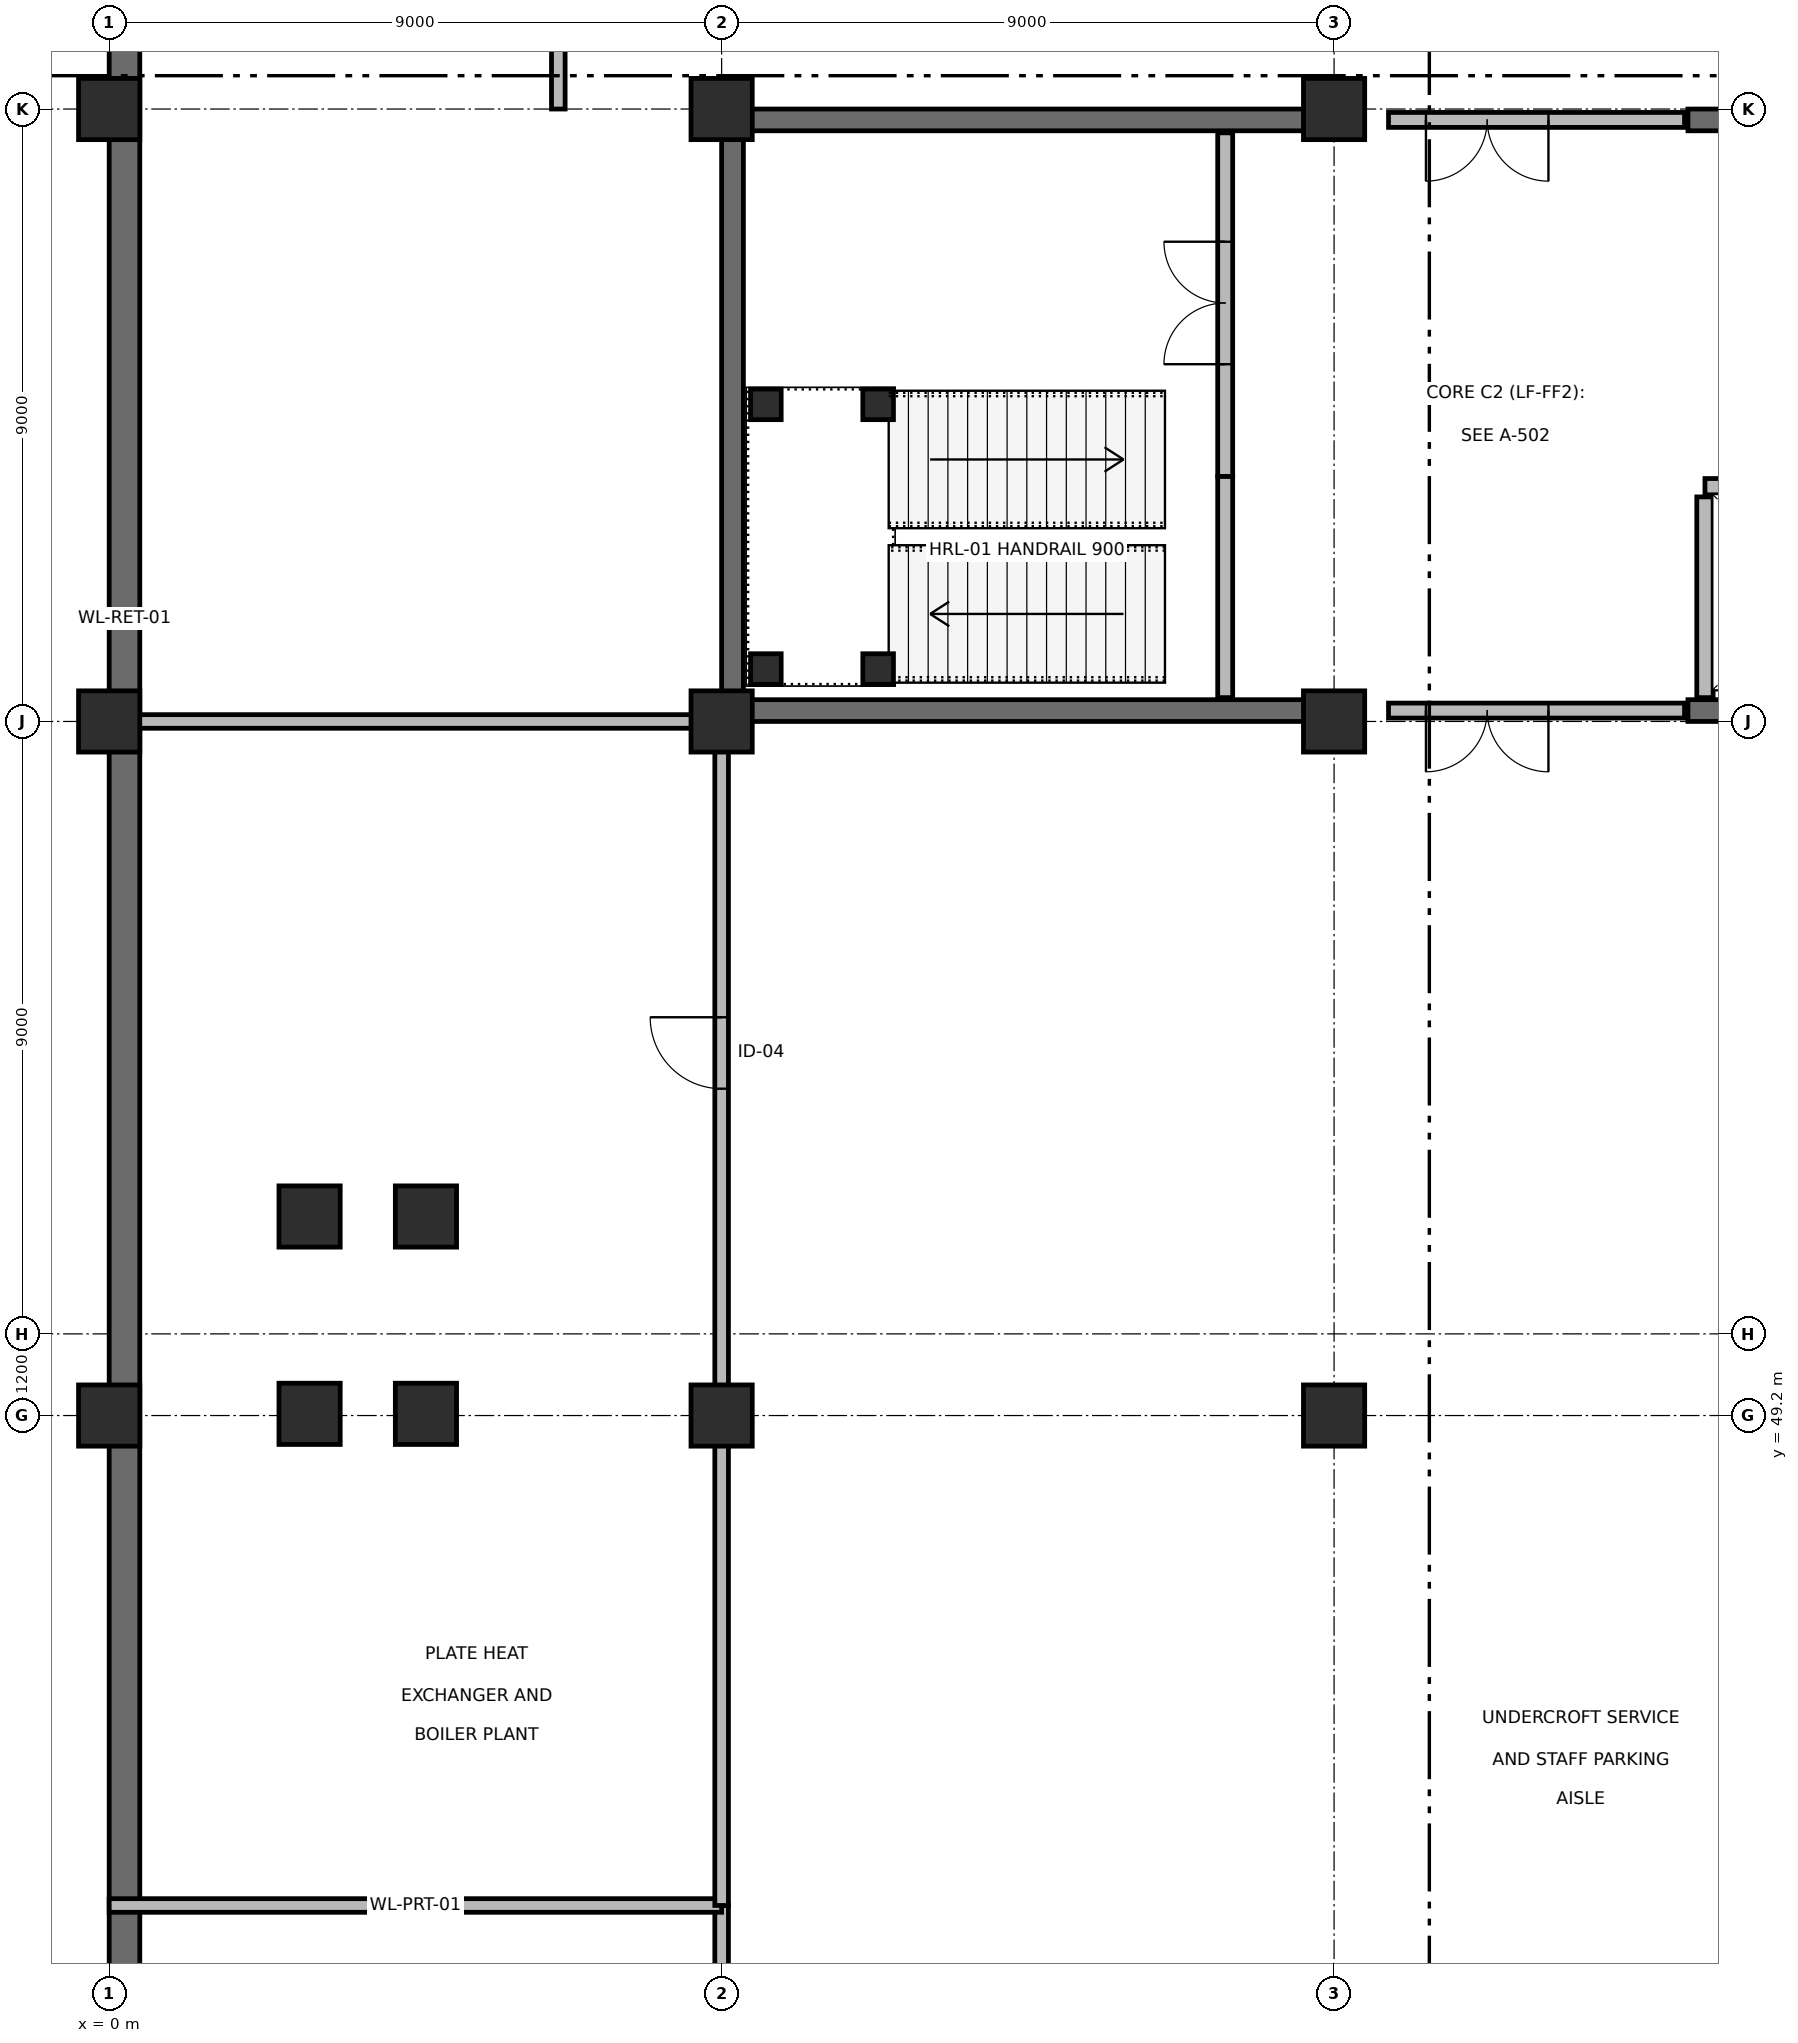
"""IFC4 building model, lengths in metres.
Left out: names, types, materials, properties, quantities, classifications, styles, units other than length and angle.
Written with IfcOpenShell. Run it as: python <this file> out.ifc"""

import sys

from ifc_helpers import new_model, si_unit, direction, frame, frame_2d, origin, origin_2d, place, context, subcontext, project, spatial, rectangle, extrude, element, fill, save


model = new_model("IFC4")
c1 = context("Model", 3, precision=1e-05, world=origin(), true_north=direction((0.0, 1.0)))
c2 = subcontext(c1, "Body", "Model", "MODEL_VIEW")
j1 = project(units=[si_unit("LENGTHUNIT", "METRE"), si_unit("PLANEANGLEUNIT", "RADIAN")], contexts=[c1])
p1 = place(None, origin())
s1 = spatial("IfcSite", under=j1, at=p1, CompositionType="ELEMENT")
p2 = place(p1, origin())
s2 = spatial("IfcBuilding", under=s1, at=p2, CompositionType="ELEMENT")
p3 = place(p2, frame((0.0, 0.0, -4.8)))
s3 = spatial("IfcBuildingStorey", under=s2, at=p3, CompositionType="ELEMENT", Elevation=-4.8)
for number, where, z_axis, x_axis in (
    (1, (0.0, 49.2, 0.0), (0.0, 0.0, 1.0), (1.0, 0.0, 0.0)),
    (2, (0.0, 59.4, 0.0), (0.0, 0.0, 1.0), (1.0, 0.0, 0.0)),
    (3, (0.0, 68.4, 0.0), (0.0, 0.0, 1.0), (1.0, 0.0, 0.0)),
    (4, (9.0, 49.2, 0.0), (0.0, 0.0, 1.0), (1.0, 0.0, 0.0)),
    (5, (9.0, 59.4, 0.0), (0.0, 0.0, 1.0), (1.0, 0.0, 0.0)),
    (6, (9.0, 68.4, 0.0), (0.0, 0.0, 1.0), (1.0, 0.0, 0.0)),
    (7, (18.0, 49.2, 0.0), (0.0, 0.0, 1.0), (1.0, 0.0, 0.0)),
    (8, (18.0, 59.4, 0.0), (0.0, 0.0, 1.0), (1.0, 0.0, 0.0)),
    (9, (18.0, 68.4, 0.0), (0.0, 0.0, 1.0), (1.0, 0.0, 0.0)),
    (10, (2.945, 49.225, 0.0), (0.0, 0.0, 1.0), (1.0, 0.0, 0.0)),
    (11, (2.945, 52.125, 0.0), (0.0, 0.0, 1.0), (1.0, 0.0, 0.0)),
    (12, (4.655, 49.225, 0.0), (0.0, 0.0, 1.0), (1.0, 0.0, 0.0)),
    (13, (4.655, 52.125, 0.0), (0.0, 0.0, 1.0), (1.0, 0.0, 0.0)),
):
    element("IfcColumn", number, at=place(p3, frame(where, z_axis=z_axis, x_axis=x_axis)), inside=s3, PredefinedType="COLUMN", context=c2, shape_type="SweptSolid", body=[
        extrude(rectangle(XDim=0.9, YDim=0.9, at=origin_2d()), origin(), (0.0, 0.0, 1.0), 4.8),
    ])
p4 = place(p3, frame((0.225, 4.65, 0.0), z_axis=(0.0, 0.0, 1.0), x_axis=(0.0, 1.0, 0.0)))
e14 = element("IfcWall", 14, at=p4, inside=s3, PredefinedType="USERDEFINED", context=c2, shape_type="SweptSolid", body=[
    extrude(rectangle(XDim=110.1, YDim=0.45, at=frame_2d((55.05, 0.0))), origin(), (0.0, 0.0, 1.0), 4.5),
])
p5 = place(p3, frame((9.0, 59.56, 0.0), z_axis=(0.0, 0.0, 1.0), x_axis=(1.0, 0.0, 0.0)))
e15 = element("IfcWall", 15, at=p5, inside=s3, PredefinedType="SHEAR", context=c2, shape_type="SweptSolid", body=[
    extrude(rectangle(XDim=9.2, YDim=0.32, at=frame_2d((4.6, 0.0))), origin(), (0.0, 0.0, 1.0), 4.8),
])
p6 = place(p3, frame((23.2, 59.56, 0.0), z_axis=(0.0, 0.0, 1.0), x_axis=(1.0, 0.0, 0.0)))
e16 = element("IfcWall", 16, at=p6, inside=s3, PredefinedType="SHEAR", context=c2, shape_type="SweptSolid", body=[
    extrude(rectangle(XDim=3.8, YDim=0.32, at=frame_2d((1.9, 0.0))), origin(), (0.0, 0.0, 1.0), 4.8),
])
p7 = place(p3, frame((9.0, 68.24, 0.0), z_axis=(0.0, 0.0, 1.0), x_axis=(1.0, 0.0, 0.0)))
e17 = element("IfcWall", 17, at=p7, inside=s3, PredefinedType="SHEAR", context=c2, shape_type="SweptSolid", body=[
    extrude(rectangle(XDim=9.2, YDim=0.32, at=frame_2d((4.6, 0.0))), origin(), (0.0, 0.0, 1.0), 4.8),
])
p8 = place(p3, frame((23.2, 68.24, 0.0), z_axis=(0.0, 0.0, 1.0), x_axis=(1.0, 0.0, 0.0)))
e18 = element("IfcWall", 18, at=p8, inside=s3, PredefinedType="SHEAR", context=c2, shape_type="SweptSolid", body=[
    extrude(rectangle(XDim=3.8, YDim=0.32, at=frame_2d((1.9, 0.0))), origin(), (0.0, 0.0, 1.0), 4.8),
])
p9 = place(p3, frame((9.16, 59.72, 0.0), z_axis=(0.0, 0.0, 1.0), x_axis=(0.0, 1.0, 0.0)))
e19 = element("IfcWall", 19, at=p9, inside=s3, PredefinedType="SHEAR", context=c2, shape_type="SweptSolid", body=[
    extrude(rectangle(XDim=8.36, YDim=0.32, at=frame_2d((4.18, 0.0))), origin(), (0.0, 0.0, 1.0), 4.8),
])
p10 = place(p3, frame((16.4, 68.05, 0.0), z_axis=(0.0, 0.0, 1.0), x_axis=(0.0, -1.0, 0.0)))
e20 = element("IfcWall", 20, at=p10, inside=s3, PredefinedType="PARTITIONING", context=c2, shape_type="SweptSolid", body=[
    extrude(rectangle(XDim=5.05, YDim=0.22, at=frame_2d((2.525, 0.0))), origin(), (0.0, 0.0, 1.0), 3.835),
])
p11 = place(p10, frame((1.6, 0.0, 0.0)))
e21 = element("IfcOpeningElement", 21, at=p11, cuts=e20, PredefinedType="OPENING", context=c2, shape_type="SweptSolid", body=[
    extrude(rectangle(XDim=1.8, YDim=2.2, at=frame_2d((0.9, 1.1))), frame((0.0, 0.12, 0.0), z_axis=(0.0, -1.0, 0.0), x_axis=(1.0, 0.0, 0.0)), (0.0, 0.0, 1.0), 0.24),
])
p12 = place(p3, frame((16.4, 59.75, 0.0), z_axis=(0.0, 0.0, 1.0), x_axis=(0.0, 1.0, 0.0)))
e22 = element("IfcWall", 22, at=p12, inside=s3, PredefinedType="PARTITIONING", context=c2, shape_type="SweptSolid", body=[
    extrude(rectangle(XDim=3.25, YDim=0.22, at=frame_2d((1.625, 0.0))), origin(), (0.0, 0.0, 1.0), 3.835),
])
p13 = place(p3, frame((23.45, 62.85, 0.0), z_axis=(0.0, 0.0, 1.0), x_axis=(1.0, 0.0, 0.0)))
e23 = element("IfcWall", 23, at=p13, inside=s3, PredefinedType="SOLIDWALL", context=c2, shape_type="SweptSolid", body=[
    extrude(rectangle(XDim=3.1, YDim=0.24, at=frame_2d((1.55, 0.0))), origin(), (0.0, 0.0, 1.0), 4.505),
])
p14 = place(p13, frame((0.95, 0.0, 0.0)))
e24 = element("IfcOpeningElement", 24, at=p14, cuts=e23, PredefinedType="OPENING", context=c2, shape_type="SweptSolid", body=[
    extrude(rectangle(XDim=1.2, YDim=2.2, at=frame_2d((0.6, 1.1))), frame((0.0, 0.13, 0.0), z_axis=(0.0, -1.0, 0.0), x_axis=(1.0, 0.0, 0.0)), (0.0, 0.0, 1.0), 0.26),
])
p15 = place(p3, frame((23.45, 59.75, 0.0), z_axis=(0.0, 0.0, 1.0), x_axis=(0.0, 1.0, 0.0)))
e25 = element("IfcWall", 25, at=p15, inside=s3, PredefinedType="SOLIDWALL", context=c2, shape_type="SweptSolid", body=[
    extrude(rectangle(XDim=2.95, YDim=0.24, at=frame_2d((1.475, 0.0))), origin(), (0.0, 0.0, 1.0), 3.835),
])
p16 = place(p3, frame((18.8, 59.56, 0.0), z_axis=(0.0, 0.0, 1.0), x_axis=(1.0, 0.0, 0.0)))
e26 = element("IfcWall", 26, at=p16, inside=s3, PredefinedType="PARTITIONING", context=c2, shape_type="SweptSolid", body=[
    extrude(rectangle(XDim=4.35, YDim=0.22, at=frame_2d((2.175, 0.0))), origin(), (0.0, 0.0, 1.0), 3.835),
])
p17 = place(p16, frame((0.55, 0.0, 0.0)))
e27 = element("IfcOpeningElement", 27, at=p17, cuts=e26, PredefinedType="OPENING", context=c2, shape_type="SweptSolid", body=[
    extrude(rectangle(XDim=1.8, YDim=2.2, at=frame_2d((0.9, 1.1))), frame((0.0, 0.12, 0.0), z_axis=(0.0, -1.0, 0.0), x_axis=(1.0, 0.0, 0.0)), (0.0, 0.0, 1.0), 0.24),
])
p18 = place(p3, frame((18.8, 68.24, 0.0), z_axis=(0.0, 0.0, 1.0), x_axis=(1.0, 0.0, 0.0)))
e28 = element("IfcWall", 28, at=p18, inside=s3, PredefinedType="PARTITIONING", context=c2, shape_type="SweptSolid", body=[
    extrude(rectangle(XDim=4.35, YDim=0.22, at=frame_2d((2.175, 0.0))), origin(), (0.0, 0.0, 1.0), 3.835),
])
p19 = place(p18, frame((0.55, 0.0, 0.0)))
e29 = element("IfcOpeningElement", 29, at=p19, cuts=e28, PredefinedType="OPENING", context=c2, shape_type="SweptSolid", body=[
    extrude(rectangle(XDim=1.8, YDim=2.2, at=frame_2d((0.9, 1.1))), frame((0.0, 0.12, 0.0), z_axis=(0.0, -1.0, 0.0), x_axis=(1.0, 0.0, 0.0)), (0.0, 0.0, 1.0), 0.24),
])
p20 = place(p3, frame((9.0, 22.2, 0.0), z_axis=(0.0, 0.0, 1.0), x_axis=(0.0, 1.0, 0.0)))
e30 = element("IfcWall", 30, at=p20, inside=s3, PredefinedType="PARTITIONING", context=c2, shape_type="SweptSolid", body=[
    extrude(rectangle(XDim=19.8, YDim=0.2, at=frame_2d((9.9, 0.0))), origin(), (0.0, 0.0, 1.0), 3.735),
])
p21 = place(p20, frame((11.701, 0.0, 0.0)))
e31 = element("IfcOpeningElement", 31, at=p21, cuts=e30, PredefinedType="OPENING", context=c2, shape_type="SweptSolid", body=[
    extrude(rectangle(XDim=1.15, YDim=2.2, at=frame_2d((0.575, 1.1))), frame((0.0, 0.11, 0.0), z_axis=(0.0, -1.0, 0.0), x_axis=(1.0, 0.0, 0.0)), (0.0, 0.0, 1.0), 0.22),
])
p22 = place(p3, frame((0.0, 42.0, 0.0), z_axis=(0.0, 0.0, 1.0), x_axis=(1.0, 0.0, 0.0)))
e32 = element("IfcWall", 32, at=p22, inside=s3, PredefinedType="PARTITIONING", context=c2, shape_type="SweptSolid", body=[
    extrude(rectangle(XDim=9.0, YDim=0.2, at=frame_2d((4.5, 0.0))), origin(), (0.0, 0.0, 1.0), 3.785),
])
p23 = place(p3, frame((9.0, 42.0, 0.0), z_axis=(0.0, 0.0, 1.0), x_axis=(0.0, 1.0, 0.0)))
e33 = element("IfcWall", 33, at=p23, inside=s3, PredefinedType="PARTITIONING", context=c2, shape_type="SweptSolid", body=[
    extrude(rectangle(XDim=17.4, YDim=0.2, at=frame_2d((8.7, 0.0))), origin(), (0.0, 0.0, 1.0), 3.735),
])
p24 = place(p23, frame((12.003, 0.0, 0.0)))
e34 = element("IfcOpeningElement", 34, at=p24, cuts=e33, PredefinedType="OPENING", context=c2, shape_type="SweptSolid", body=[
    extrude(rectangle(XDim=1.05, YDim=2.15, at=frame_2d((0.525, 1.075))), frame((0.0, 0.11, 0.0), z_axis=(0.0, -1.0, 0.0), x_axis=(1.0, 0.0, 0.0)), (0.0, 0.0, 1.0), 0.22),
])
p25 = place(p3, frame((0.0, 59.4, 0.0), z_axis=(0.0, 0.0, 1.0), x_axis=(1.0, 0.0, 0.0)))
e35 = element("IfcWall", 35, at=p25, inside=s3, PredefinedType="PARTITIONING", context=c2, shape_type="SweptSolid", body=[
    extrude(rectangle(XDim=9.0, YDim=0.2, at=frame_2d((4.5, 0.0))), origin(), (0.0, 0.0, 1.0), 3.835),
])
p26 = place(p3, frame((6.6, 68.4, 0.0), z_axis=(0.0, 0.0, 1.0), x_axis=(0.0, 1.0, 0.0)))
e36 = element("IfcWall", 36, at=p26, inside=s3, PredefinedType="PARTITIONING", context=c2, shape_type="SweptSolid", body=[
    extrude(rectangle(XDim=18.0, YDim=0.2, at=frame_2d((9.0, 0.0))), origin(), (0.0, 0.0, 1.0), 3.835),
])
for number, where, z_axis, x_axis in (
    (37, (9.65, 60.17, 0.0), (0.0, 0.0, 1.0), (1.0, 0.0, 0.0)),
    (38, (11.3, 60.17, 0.0), (0.0, 0.0, 1.0), (1.0, 0.0, 0.0)),
    (39, (9.65, 64.06, 0.0), (0.0, 0.0, 1.0), (1.0, 0.0, 0.0)),
    (40, (11.3, 64.06, 0.0), (0.0, 0.0, 1.0), (1.0, 0.0, 0.0)),
):
    element("IfcColumn", number, at=place(p3, frame(where, z_axis=z_axis, x_axis=x_axis)), inside=s3, PredefinedType="COLUMN", context=c2, shape_type="SweptSolid", body=[
        extrude(rectangle(XDim=0.45, YDim=0.45, at=origin_2d()), origin(), (0.0, 0.0, 1.0), 4.8),
    ])
p27 = place(p11, origin())
e41 = element("IfcDoor", 41, at=p27, inside=s3, OperationType="DOUBLE_DOOR_SINGLE_SWING", PredefinedType="DOOR", context=c2, shape_type="SweptSolid", body=[
    extrude(rectangle(XDim=1.8, YDim=2.2, at=frame_2d((0.9, 1.1))), frame((0.0, 0.025, 0.0), z_axis=(0.0, -1.0, 0.0), x_axis=(1.0, 0.0, 0.0)), (0.0, 0.0, 1.0), 0.05),
])
fill(e21, e41)
p28 = place(p17, origin())
e42 = element("IfcDoor", 42, at=p28, inside=s3, OperationType="DOUBLE_DOOR_SINGLE_SWING", PredefinedType="DOOR", context=c2, shape_type="SweptSolid", body=[
    extrude(rectangle(XDim=1.8, YDim=2.2, at=frame_2d((0.9, 1.1))), frame((0.0, 0.025, 0.0), z_axis=(0.0, -1.0, 0.0), x_axis=(1.0, 0.0, 0.0)), (0.0, 0.0, 1.0), 0.05),
])
fill(e27, e42)
p29 = place(p19, origin())
e43 = element("IfcDoor", 43, at=p29, inside=s3, OperationType="DOUBLE_DOOR_SINGLE_SWING", PredefinedType="DOOR", context=c2, shape_type="SweptSolid", body=[
    extrude(rectangle(XDim=1.8, YDim=2.2, at=frame_2d((0.9, 1.1))), frame((0.0, 0.025, 0.0), z_axis=(0.0, -1.0, 0.0), x_axis=(1.0, 0.0, 0.0)), (0.0, 0.0, 1.0), 0.05),
])
fill(e29, e43)
p30 = place(p24, origin())
e44 = element("IfcDoor", 44, at=p30, inside=s3, OperationType="SINGLE_SWING_RIGHT", PredefinedType="DOOR", context=c2, shape_type="SweptSolid", body=[
    extrude(rectangle(XDim=1.05, YDim=2.15, at=frame_2d((0.525, 1.075))), frame((0.0, 0.025, 0.0), z_axis=(0.0, -1.0, 0.0), x_axis=(1.0, 0.0, 0.0)), (0.0, 0.0, 1.0), 0.05),
])
fill(e34, e44)
save(model, sys.argv[1])
